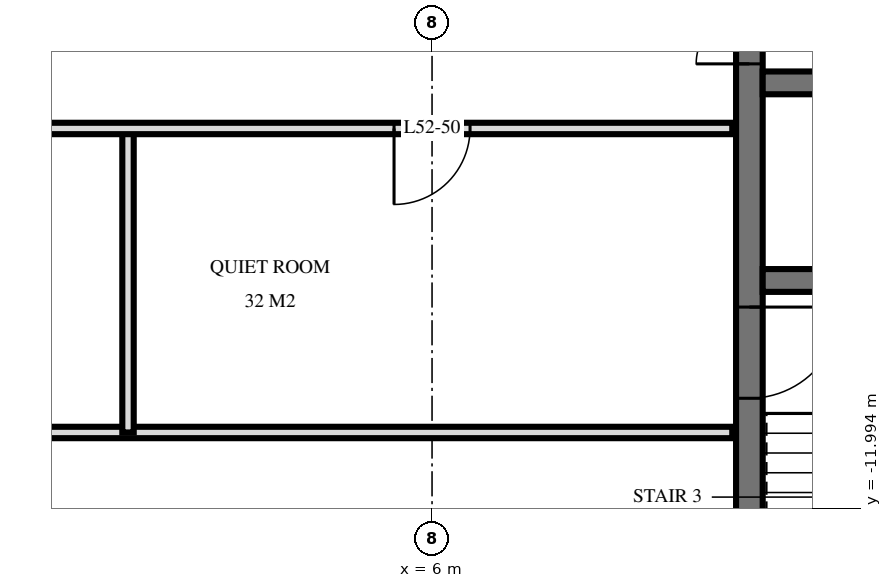
"""IFC4 building model, lengths in metres.
Left out: names, types, materials, properties, quantities, classifications, styles, units other than length and angle.
Written with IfcOpenShell. Run it as: python <this file> out.ifc"""

import sys

from ifc_helpers import new_model, si_unit, direction, frame, frame_2d, origin, place, context, subcontext, project, spatial, rectangle, extrude, element, fill, save


model = new_model("IFC4")
c1 = context("Model", 3, precision=1e-05, world=origin(), true_north=direction((0.0, 1.0)))
c2 = subcontext(c1, "Body", "Model", "MODEL_VIEW")
j1 = project(units=[si_unit("LENGTHUNIT", "METRE"), si_unit("PLANEANGLEUNIT", "RADIAN")], contexts=[c1])
p1 = place(None, origin())
s1 = spatial("IfcSite", under=j1, at=p1, CompositionType="ELEMENT")
p2 = place(p1, origin())
s2 = spatial("IfcBuilding", under=s1, at=p2, CompositionType="ELEMENT")
p3 = place(p2, frame((0.0, 0.0, 201.1)))
s3 = spatial("IfcBuildingStorey", under=s2, at=p3, CompositionType="ELEMENT", Elevation=201.1)
p4 = place(p3, frame((10.175, -14.55, 0.0), z_axis=(0.0, 0.0, 1.0), x_axis=(0.0, 1.0, 0.0)))
e1 = element("IfcWall", 1, at=p4, inside=s3, PredefinedType="SHEAR", context=c2, shape_type="SweptSolid", body=[
    extrude(rectangle(XDim=14.1, YDim=0.35, at=frame_2d((7.05, 0.0))), origin(), (0.0, 0.0, 1.0), 3.5),
])
p5 = place(p4, frame((8.4, 0.0, 0.0)))
e2 = element("IfcOpeningElement", 2, at=p5, cuts=e1, PredefinedType="OPENING", context=c2, shape_type="SweptSolid", body=[
    extrude(rectangle(XDim=1.4, YDim=2.4, at=frame_2d((0.7, 1.2))), frame((0.0, 0.185, 0.0), z_axis=(0.0, -1.0, 0.0), x_axis=(1.0, 0.0, 0.0)), (0.0, 0.0, 1.0), 0.37),
])
p6 = place(p4, frame((10.0, 0.0, 0.0)))
e3 = element("IfcOpeningElement", 3, at=p6, cuts=e1, PredefinedType="OPENING", context=c2, shape_type="SweptSolid", body=[
    extrude(rectangle(XDim=1.4, YDim=2.4, at=frame_2d((0.7, 1.2))), frame((0.0, 0.185, 0.0), z_axis=(0.0, -1.0, 0.0), x_axis=(1.0, 0.0, 0.0)), (0.0, 0.0, 1.0), 0.37),
])
p7 = place(p4, frame((4.0, 0.0, 0.0)))
e4 = element("IfcOpeningElement", 4, at=p7, cuts=e1, PredefinedType="OPENING", context=c2, shape_type="SweptSolid", body=[
    extrude(rectangle(XDim=1.2, YDim=2.1, at=frame_2d((0.6, 1.05))), frame((0.0, 0.185, 0.0), z_axis=(0.0, -1.0, 0.0), x_axis=(1.0, 0.0, 0.0)), (0.0, 0.0, 1.0), 0.37),
])
p8 = place(p3, frame((10.35, -6.4, 0.0), z_axis=(0.0, 0.0, 1.0), x_axis=(1.0, 0.0, 0.0)))
e5 = element("IfcWall", 5, at=p8, inside=s3, PredefinedType="SHEAR", context=c2, shape_type="SweptSolid", body=[
    extrude(rectangle(XDim=13.7, YDim=0.3, at=frame_2d((6.85, 0.0))), origin(), (0.0, 0.0, 1.0), 3.5),
])
p9 = place(p8, frame((12.05, 0.0, 0.0)))
e6 = element("IfcOpeningElement", 6, at=p9, cuts=e5, PredefinedType="OPENING", context=c2, shape_type="SweptSolid", body=[
    extrude(rectangle(XDim=1.1, YDim=2.1, at=frame_2d((0.55, 1.05))), frame((0.0, 0.16, 0.0), z_axis=(0.0, -1.0, 0.0), x_axis=(1.0, 0.0, 0.0)), (0.0, 0.0, 1.0), 0.32),
])
p10 = place(p8, frame((6.8, 0.0, 0.0)))
e7 = element("IfcOpeningElement", 7, at=p10, cuts=e5, PredefinedType="OPENING", context=c2, shape_type="SweptSolid", body=[
    extrude(rectangle(XDim=1.1, YDim=2.1, at=frame_2d((0.55, 1.05))), frame((0.0, 0.16, 0.0), z_axis=(0.0, -1.0, 0.0), x_axis=(1.0, 0.0, 0.0)), (0.0, 0.0, 1.0), 0.32),
])
p11 = place(p3, frame((10.35, -9.0, 0.0), z_axis=(0.0, 0.0, 1.0), x_axis=(1.0, 0.0, 0.0)))
e8 = element("IfcWall", 8, at=p11, inside=s3, PredefinedType="SHEAR", context=c2, shape_type="SweptSolid", body=[
    extrude(rectangle(XDim=13.7, YDim=0.3, at=frame_2d((6.85, 0.0))), origin(), (0.0, 0.0, 1.0), 3.5),
])
p12 = place(p11, frame((3.8, 0.0, 0.0)))
e9 = element("IfcOpeningElement", 9, at=p12, cuts=e8, PredefinedType="OPENING", context=c2, shape_type="SweptSolid", body=[
    extrude(rectangle(XDim=1.1, YDim=2.1, at=frame_2d((0.55, 1.05))), frame((0.0, 0.16, 0.0), z_axis=(0.0, -1.0, 0.0), x_axis=(1.0, 0.0, 0.0)), (0.0, 0.0, 1.0), 0.32),
])
p13 = place(p3, frame((2.0, -11.0, 0.0), z_axis=(0.0, 0.0, 1.0), x_axis=(0.0, 1.0, 0.0)))
e10 = element("IfcWall", 10, at=p13, inside=s3, PredefinedType="PARTITIONING", context=c2, shape_type="SweptSolid", body=[
    extrude(rectangle(XDim=4.0, YDim=0.15, at=frame_2d((2.0, 0.0))), origin(), (0.0, 0.0, 1.0), 3.22),
])
p14 = place(p3, frame((-9.95, -11.0, 0.0), z_axis=(0.0, 0.0, 1.0), x_axis=(1.0, 0.0, 0.0)))
e11 = element("IfcWall", 11, at=p14, inside=s3, PredefinedType="PARTITIONING", context=c2, shape_type="SweptSolid", body=[
    extrude(rectangle(XDim=19.9, YDim=0.15, at=frame_2d((9.95, 0.0))), origin(), (0.0, 0.0, 1.0), 3.22),
])
p15 = place(p14, frame((9.45, 0.0, 0.0)))
e12 = element("IfcOpeningElement", 12, at=p15, cuts=e11, PredefinedType="OPENING", context=c2, shape_type="SweptSolid", body=[
    extrude(rectangle(XDim=1.0, YDim=2.1, at=frame_2d((0.5, 1.05))), frame((0.0, 0.085, 0.0), z_axis=(0.0, -1.0, 0.0), x_axis=(1.0, 0.0, 0.0)), (0.0, 0.0, 1.0), 0.17),
])
p16 = place(p14, frame((3.45, 0.0, 0.0)))
e13 = element("IfcOpeningElement", 13, at=p16, cuts=e11, PredefinedType="OPENING", context=c2, shape_type="SweptSolid", body=[
    extrude(rectangle(XDim=1.0, YDim=2.1, at=frame_2d((0.5, 1.05))), frame((0.0, 0.085, 0.0), z_axis=(0.0, -1.0, 0.0), x_axis=(1.0, 0.0, 0.0)), (0.0, 0.0, 1.0), 0.17),
])
p17 = place(p3, frame((-9.95, -7.0, 0.0), z_axis=(0.0, 0.0, 1.0), x_axis=(1.0, 0.0, 0.0)))
e14 = element("IfcWall", 14, at=p17, inside=s3, PredefinedType="PARTITIONING", context=c2, shape_type="SweptSolid", body=[
    extrude(rectangle(XDim=19.9, YDim=0.15, at=frame_2d((9.95, 0.0))), origin(), (0.0, 0.0, 1.0), 3.22),
])
p18 = place(p17, frame((9.45, 0.0, 0.0)))
e15 = element("IfcOpeningElement", 15, at=p18, cuts=e14, PredefinedType="OPENING", context=c2, shape_type="SweptSolid", body=[
    extrude(rectangle(XDim=1.0, YDim=2.1, at=frame_2d((0.5, 1.05))), frame((0.0, 0.085, 0.0), z_axis=(0.0, -1.0, 0.0), x_axis=(1.0, 0.0, 0.0)), (0.0, 0.0, 1.0), 0.17),
])
p19 = place(p17, frame((15.45, 0.0, 0.0)))
e16 = element("IfcOpeningElement", 16, at=p19, cuts=e14, PredefinedType="OPENING", context=c2, shape_type="SweptSolid", body=[
    extrude(rectangle(XDim=1.0, YDim=2.1, at=frame_2d((0.5, 1.05))), frame((0.0, 0.085, 0.0), z_axis=(0.0, -1.0, 0.0), x_axis=(1.0, 0.0, 0.0)), (0.0, 0.0, 1.0), 0.17),
])
p20 = place(p5, origin())
e17 = element("IfcDoor", 17, at=p20, inside=s3, OperationType="DOUBLE_DOOR_SINGLE_SWING", PredefinedType="DOOR", context=c2, shape_type="SweptSolid", body=[
    extrude(rectangle(XDim=1.4, YDim=2.4, at=frame_2d((0.7, 1.2))), frame((0.0, 0.025, 0.0), z_axis=(0.0, -1.0, 0.0), x_axis=(1.0, 0.0, 0.0)), (0.0, 0.0, 1.0), 0.05),
])
fill(e2, e17)
p21 = place(p7, frame((0.6, 0.0, 0.0), z_axis=(0.0, 0.0, 1.0), x_axis=(-1.0, 0.0, 0.0)))
e18 = element("IfcDoor", 18, at=p21, inside=s3, OperationType="SINGLE_SWING_RIGHT", PredefinedType="DOOR", context=c2, shape_type="SweptSolid", body=[
    extrude(rectangle(XDim=1.2, YDim=2.1, at=frame_2d((0.0, 1.05))), frame((0.0, -0.025, 0.0), z_axis=(0.0, 1.0, 0.0), x_axis=(-1.0, 0.0, 0.0)), (0.0, 0.0, 1.0), 0.05),
])
fill(e4, e18)
p22 = place(p19, frame((0.5, 0.0, 0.0), z_axis=(0.0, 0.0, 1.0), x_axis=(-1.0, 0.0, 0.0)))
e19 = element("IfcDoor", 19, at=p22, inside=s3, OperationType="SINGLE_SWING_LEFT", PredefinedType="DOOR", context=c2, shape_type="SweptSolid", body=[
    extrude(rectangle(XDim=1.0, YDim=2.1, at=frame_2d((0.0, 1.05))), frame((0.0, -0.025, 0.0), z_axis=(0.0, 1.0, 0.0), x_axis=(-1.0, 0.0, 0.0)), (0.0, 0.0, 1.0), 0.05),
])
fill(e16, e19)
save(model, sys.argv[1])
